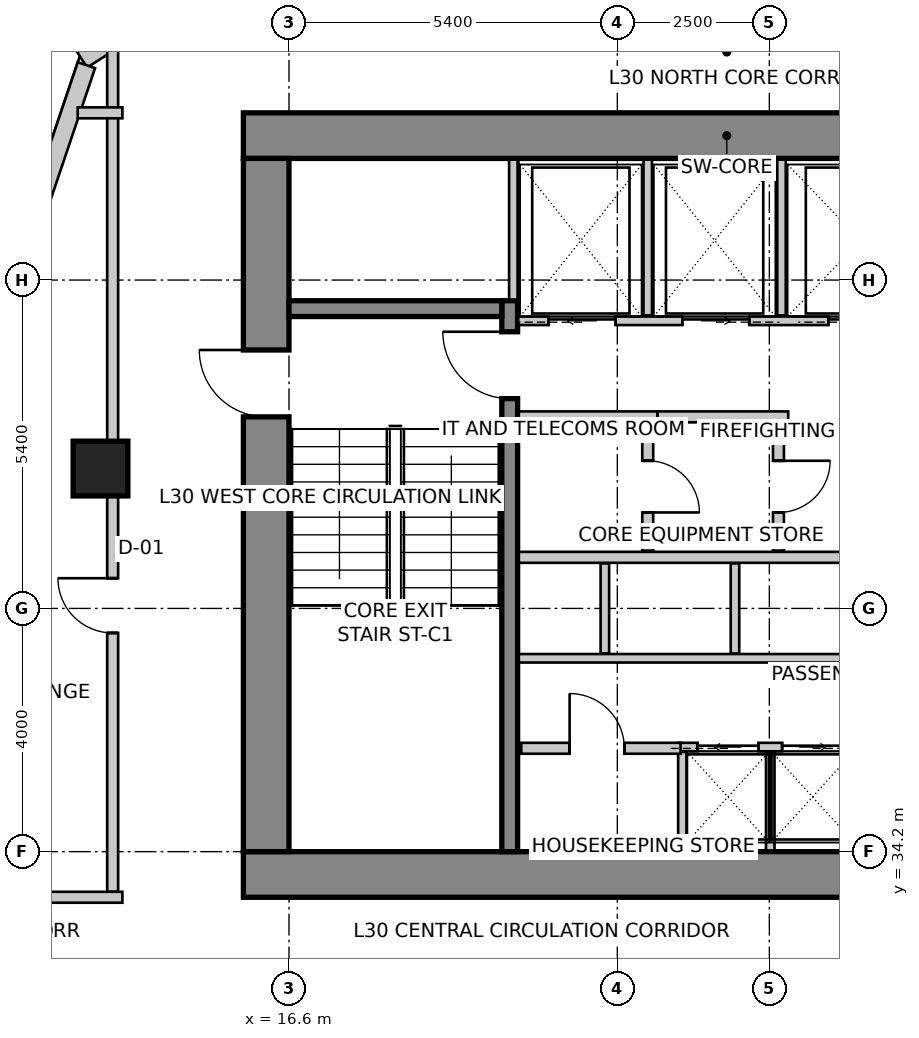
"""IFC4 building model, lengths in metres.
Left out: names, types, materials, properties, quantities, classifications, styles, units other than length and angle.
Written with IfcOpenShell. Run it as: python <this file> out.ifc"""

import sys

from ifc_helpers import new_model, si_unit, direction, frame, frame_2d, origin, origin_2d, place, context, subcontext, project, spatial, rectangle, extrude, source, transform, mapped, element, fill, save


model = new_model("IFC4")
c1 = context("Model", 3, precision=1e-05, world=origin(), true_north=direction((0.0, 1.0)))
c2 = subcontext(c1, "Body", "Model", "MODEL_VIEW")
j1 = project(units=[si_unit("LENGTHUNIT", "METRE"), si_unit("PLANEANGLEUNIT", "RADIAN")], contexts=[c1])
p1 = place(None, origin())
s1 = spatial("IfcSite", under=j1, at=p1, CompositionType="ELEMENT")
p2 = place(p1, origin())
s2 = spatial("IfcBuilding", under=s1, at=p2, CompositionType="ELEMENT")
p3 = place(p2, frame((0.0, 0.0, 125.0)))
s3 = spatial("IfcBuildingStorey", under=s2, at=p3, CompositionType="ELEMENT", Elevation=125.0)
p4 = place(p3, frame((15.85, 45.975, 0.0), z_axis=(0.0, 0.0, 1.0), x_axis=(1.0, 0.0, 0.0)))
e1 = element("IfcWall", 1, at=p4, inside=s3, PredefinedType="SHEAR", context=c2, shape_type="SweptSolid", body=[
    extrude(rectangle(XDim=15.9, YDim=0.75, at=frame_2d((7.95, 0.0))), origin(), (0.0, 0.0, 1.0), 3.6),
])
p5 = place(p3, frame((15.85, 33.825, 0.0), z_axis=(0.0, 0.0, 1.0), x_axis=(1.0, 0.0, 0.0)))
e2 = element("IfcWall", 2, at=p5, inside=s3, PredefinedType="SHEAR", context=c2, shape_type="SweptSolid", body=[
    extrude(rectangle(XDim=15.9, YDim=0.75, at=frame_2d((7.95, 0.0))), origin(), (0.0, 0.0, 1.0), 3.6),
])
m1 = source(origin(), c2, "Body", "SweptSolid", [
    extrude(rectangle(XDim=1.3, YDim=2.15, at=frame_2d((0.65, 1.075))), frame((0.0, 0.385, 0.0), z_axis=(0.0, -1.0, 0.0), x_axis=(1.0, 0.0, 0.0)), (0.0, 0.0, 1.0), 0.77),
])
p6 = place(p5, frame((10.08, 0.0, 0.0)))
e3 = element("IfcOpeningElement", 3, at=p6, cuts=e2, PredefinedType="OPENING", context=c2, shape_type="MappedRepresentation", body=[
    mapped(m1, transform((0.0, 0.0, 0.0), scale=1.0)),
])
p7 = place(p3, frame((16.225, 34.2, 0.0), z_axis=(0.0, 0.0, 1.0), x_axis=(0.0, 1.0, 0.0)))
e4 = element("IfcWall", 4, at=p7, inside=s3, PredefinedType="SHEAR", context=c2, shape_type="SweptSolid", body=[
    extrude(rectangle(XDim=11.4, YDim=0.75, at=frame_2d((5.7, 0.0))), origin(), (0.0, 0.0, 1.0), 3.6),
])
m2 = source(origin(), c2, "Body", "SweptSolid", [
    extrude(rectangle(XDim=1.1, YDim=2.15, at=frame_2d((0.55, 1.075))), frame((0.0, 0.385, 0.0), z_axis=(0.0, -1.0, 0.0), x_axis=(1.0, 0.0, 0.0)), (0.0, 0.0, 1.0), 0.77),
])
p8 = place(p7, frame((7.15, 0.0, 0.0)))
e5 = element("IfcOpeningElement", 5, at=p8, cuts=e4, PredefinedType="OPENING", context=c2, shape_type="MappedRepresentation", body=[
    mapped(m2, transform((0.0, 0.0, 0.0), scale=1.0)),
])
p9 = place(p3, frame((20.23, 34.2, 0.0), z_axis=(0.0, 0.0, 1.0), x_axis=(0.0, 1.0, 0.0)))
e6 = element("IfcWall", 6, at=p9, inside=s3, PredefinedType="SHEAR", context=c2, shape_type="SweptSolid", body=[
    extrude(rectangle(XDim=9.06, YDim=0.26, at=frame_2d((4.53, 0.0))), origin(), (0.0, 0.0, 1.0), 3.6),
])
m3 = source(origin(), c2, "Body", "SweptSolid", [
    extrude(rectangle(XDim=1.1, YDim=2.15, at=frame_2d((0.55, 1.075))), frame((0.0, 0.14, 0.0), z_axis=(0.0, -1.0, 0.0), x_axis=(1.0, 0.0, 0.0)), (0.0, 0.0, 1.0), 0.28),
])
p10 = place(p9, frame((7.45, 0.0, 0.0)))
e7 = element("IfcOpeningElement", 7, at=p10, cuts=e6, PredefinedType="OPENING", context=c2, shape_type="MappedRepresentation", body=[
    mapped(m3, transform((0.0, 0.0, 0.0), scale=1.0)),
])
p11 = place(p3, frame((16.6, 43.13, 0.0), z_axis=(0.0, 0.0, 1.0), x_axis=(1.0, 0.0, 0.0)))
e8 = element("IfcWall", 8, at=p11, inside=s3, PredefinedType="SHEAR", context=c2, shape_type="SweptSolid", body=[
    extrude(rectangle(XDim=3.5, YDim=0.26, at=frame_2d((1.75, 0.0))), origin(), (0.0, 0.0, 1.0), 3.6),
])
m4 = source(origin(), c2, "Body", "SweptSolid", [
    extrude(rectangle(XDim=0.9, YDim=0.9, at=origin_2d()), origin(), (0.0, 0.0, 1.0), 3.6),
])
p12 = place(p3, frame((13.5, 40.5, 0.0), z_axis=(0.0, 0.0, 1.0), x_axis=(1.0, 0.0, 0.0)))
e9 = element("IfcColumn", 9, at=p12, inside=s3, PredefinedType="COLUMN", context=c2, shape_type="MappedRepresentation", body=[
    mapped(m4, transform((0.0, 0.0, 0.0), scale=1.0)),
])
p13 = place(p3, frame((53.561, 47.48, 0.0), z_axis=(0.0, 0.0, 1.0), x_axis=(-0.985845173895, 0.167658262868, 0.0)))
e10 = element("IfcWall", 10, at=p13, inside=s3, PredefinedType="SOLIDWALL", context=c2, shape_type="SweptSolid", body=[
    extrude(rectangle(XDim=32.132, YDim=0.3, at=frame_2d((16.066, 0.0))), origin(), (0.0, 0.0, 1.0), 3.35),
])
m5 = source(origin(), c2, "Body", "SweptSolid", [
    extrude(rectangle(XDim=2.4, YDim=2.2, at=frame_2d((1.2, 1.1))), frame((0.0, 0.16, 0.0), z_axis=(0.0, -1.0, 0.0), x_axis=(1.0, 0.0, 0.0)), (0.0, 0.0, 1.0), 0.32),
])
p14 = place(p13, frame((0.882, 0.0, 0.85)))
e11 = element("IfcOpeningElement", 11, at=p14, cuts=e10, PredefinedType="OPENING", context=c2, shape_type="MappedRepresentation", body=[
    mapped(m5, transform((0.0, 0.0, 0.0), scale=1.0)),
])
p15 = place(p13, frame((6.686, 0.0, 0.85)))
e12 = element("IfcOpeningElement", 12, at=p15, cuts=e10, PredefinedType="OPENING", context=c2, shape_type="MappedRepresentation", body=[
    mapped(m5, transform((0.0, 0.0, 0.0), scale=1.0)),
])
p16 = place(p13, frame((13.449, 0.0, 0.85)))
e13 = element("IfcOpeningElement", 13, at=p16, cuts=e10, PredefinedType="OPENING", context=c2, shape_type="MappedRepresentation", body=[
    mapped(m5, transform((0.0, 0.0, 0.0), scale=1.0)),
])
m6 = source(origin(), c2, "Body", "SweptSolid", [
    extrude(rectangle(XDim=1.8, YDim=2.1, at=frame_2d((0.9, 1.05))), frame((0.0, 0.16, 0.0), z_axis=(0.0, -1.0, 0.0), x_axis=(1.0, 0.0, 0.0)), (0.0, 0.0, 1.0), 0.32),
])
p17 = place(p13, frame((17.889, 0.0, 0.85)))
e14 = element("IfcOpeningElement", 14, at=p17, cuts=e10, PredefinedType="OPENING", context=c2, shape_type="MappedRepresentation", body=[
    mapped(m6, transform((0.0, 0.0, 0.0), scale=1.0)),
])
p18 = place(p13, frame((20.309, 0.0, 0.85)))
e15 = element("IfcOpeningElement", 15, at=p18, cuts=e10, PredefinedType="OPENING", context=c2, shape_type="MappedRepresentation", body=[
    mapped(m5, transform((0.0, 0.0, 0.0), scale=1.0)),
])
p19 = place(p13, frame((25.4, 0.0, 0.85)))
e16 = element("IfcOpeningElement", 16, at=p19, cuts=e10, PredefinedType="OPENING", context=c2, shape_type="MappedRepresentation", body=[
    mapped(m5, transform((0.0, 0.0, 0.0), scale=1.0)),
])
m7 = source(origin(), c2, "Body", "SweptSolid", [
    extrude(rectangle(XDim=1.2, YDim=1.6, at=frame_2d((0.6, 0.8))), frame((0.0, 0.16, 0.0), z_axis=(0.0, -1.0, 0.0), x_axis=(1.0, 0.0, 0.0)), (0.0, 0.0, 1.0), 0.32),
])
p20 = place(p13, frame((30.5, 0.0, 0.85)))
e17 = element("IfcOpeningElement", 17, at=p20, cuts=e10, PredefinedType="OPENING", context=c2, shape_type="MappedRepresentation", body=[
    mapped(m7, transform((0.0, 0.0, 0.0), scale=1.0)),
])
p21 = place(p3, frame((21.875, 52.742, 0.0), z_axis=(0.0, 0.0, 1.0), x_axis=(-0.843662465249, -0.536873956092, 0.0)))
e18 = element("IfcWall", 18, at=p21, inside=s3, PredefinedType="SOLIDWALL", context=c2, shape_type="SweptSolid", body=[
    extrude(rectangle(XDim=10.284, YDim=0.3, at=frame_2d((5.142, 0.0))), origin(), (0.0, 0.0, 1.0), 3.35),
])
m8 = source(origin(), c2, "Body", "SweptSolid", [
    extrude(rectangle(XDim=2.1, YDim=2.0, at=frame_2d((1.05, 1.0))), frame((0.0, 0.16, 0.0), z_axis=(0.0, -1.0, 0.0), x_axis=(1.0, 0.0, 0.0)), (0.0, 0.0, 1.0), 0.32),
])
p22 = place(p21, frame((2.806, 0.0, 0.85)))
e19 = element("IfcOpeningElement", 19, at=p22, cuts=e18, PredefinedType="OPENING", context=c2, shape_type="MappedRepresentation", body=[
    mapped(m8, transform((0.0, 0.0, 0.0), scale=1.0)),
])
p23 = place(p21, frame((8.087, 0.0, 0.85)))
e20 = element("IfcOpeningElement", 20, at=p23, cuts=e18, PredefinedType="OPENING", context=c2, shape_type="MappedRepresentation", body=[
    mapped(m7, transform((0.0, 0.0, 0.0), scale=1.0)),
])
p24 = place(p3, frame((13.269, 47.134, 0.0), z_axis=(0.0, 0.0, 1.0), x_axis=(-0.319929596295, -0.947441319246, 0.0)))
e21 = element("IfcWall", 21, at=p24, inside=s3, PredefinedType="SOLIDWALL", context=c2, shape_type="SweptSolid", body=[
    extrude(rectangle(XDim=16.134, YDim=0.3, at=frame_2d((8.067, 0.0))), origin(), (0.0, 0.0, 1.0), 3.35),
])
p25 = place(p24, frame((2.276, 0.0, 0.85)))
e22 = element("IfcOpeningElement", 22, at=p25, cuts=e21, PredefinedType="OPENING", context=c2, shape_type="MappedRepresentation", body=[
    mapped(m5, transform((0.0, 0.0, 0.0), scale=1.0)),
])
p26 = place(p24, frame((7.361, 0.0, 0.85)))
e23 = element("IfcOpeningElement", 23, at=p26, cuts=e21, PredefinedType="OPENING", context=c2, shape_type="MappedRepresentation", body=[
    mapped(m8, transform((0.0, 0.0, 0.0), scale=1.0)),
])
p27 = place(p24, frame((12.147, 0.0, 0.85)))
e24 = element("IfcOpeningElement", 24, at=p27, cuts=e21, PredefinedType="OPENING", context=c2, shape_type="MappedRepresentation", body=[
    mapped(m5, transform((0.0, 0.0, 0.0), scale=1.0)),
])
p28 = place(p3, frame((20.37, 42.93, 0.0), z_axis=(0.0, 0.0, 1.0), x_axis=(1.0, 0.0, 0.0)))
e25 = element("IfcWall", 25, at=p28, inside=s3, PredefinedType="SOLIDWALL", context=c2, shape_type="SweptSolid", body=[
    extrude(rectangle(XDim=6.86, YDim=0.14, at=frame_2d((3.43, 0.0))), origin(), (0.0, 0.0, 1.0), 3.35),
])
m9 = source(origin(), c2, "Body", "SweptSolid", [
    extrude(rectangle(XDim=1.1, YDim=2.15, at=frame_2d((0.55, 1.075))), frame((0.0, 0.08, 0.0), z_axis=(0.0, -1.0, 0.0), x_axis=(1.0, 0.0, 0.0)), (0.0, 0.0, 1.0), 0.16),
])
p29 = place(p28, frame((0.5, 0.0, 0.0)))
e26 = element("IfcOpeningElement", 26, at=p29, cuts=e25, PredefinedType="OPENING", context=c2, shape_type="MappedRepresentation", body=[
    mapped(m9, transform((0.0, 0.0, 0.0), scale=1.0)),
])
p30 = place(p28, frame((2.7, 0.0, 0.0)))
e27 = element("IfcOpeningElement", 27, at=p30, cuts=e25, PredefinedType="OPENING", context=c2, shape_type="MappedRepresentation", body=[
    mapped(m9, transform((0.0, 0.0, 0.0), scale=1.0)),
])
p31 = place(p28, frame((5.1, 0.0, 0.0)))
e28 = element("IfcOpeningElement", 28, at=p31, cuts=e25, PredefinedType="OPENING", context=c2, shape_type="MappedRepresentation", body=[
    mapped(m9, transform((0.0, 0.0, 0.0), scale=1.0)),
])
p32 = place(p3, frame((20.29, 43.28, 0.0), z_axis=(0.0, 0.0, 1.0), x_axis=(0.0, 1.0, 0.0)))
e29 = element("IfcWall", 29, at=p32, inside=s3, PredefinedType="SOLIDWALL", context=c2, shape_type="SweptSolid", body=[
    extrude(rectangle(XDim=2.3, YDim=0.14, at=frame_2d((1.15, 0.0))), origin(), (0.0, 0.0, 1.0), 3.35),
])
for number, where, z_axis, x_axis in (
    (30, (22.5, 43.02, 0.0), (0.0, 0.0, 1.0), (0.0, 1.0, 0.0)),
    (31, (24.7, 43.02, 0.0), (0.0, 0.0, 1.0), (0.0, 1.0, 0.0)),
):
    element("IfcWall", number, at=place(p3, frame(where, z_axis=z_axis, x_axis=x_axis)), inside=s3, PredefinedType="SOLIDWALL", context=c2, shape_type="SweptSolid", body=[
        extrude(rectangle(XDim=2.56, YDim=0.14, at=frame_2d((1.28, 0.0))), origin(), (0.0, 0.0, 1.0), 3.35),
    ])
p33 = place(p3, frame((23.0, 35.92, 0.0), z_axis=(0.0, 0.0, 1.0), x_axis=(1.0, 0.0, 0.0)))
e32 = element("IfcWall", 32, at=p33, inside=s3, PredefinedType="SOLIDWALL", context=c2, shape_type="SweptSolid", body=[
    extrude(rectangle(XDim=3.03, YDim=0.14, at=frame_2d((1.515, 0.0))), origin(), (0.0, 0.0, 1.0), 3.35),
])
m10 = source(origin(), c2, "Body", "SweptSolid", [
    extrude(rectangle(XDim=1.0, YDim=2.15, at=frame_2d((0.5, 1.075))), frame((0.0, 0.08, 0.0), z_axis=(0.0, -1.0, 0.0), x_axis=(1.0, 0.0, 0.0)), (0.0, 0.0, 1.0), 0.16),
])
p34 = place(p33, frame((0.32, 0.0, 0.0)))
e33 = element("IfcOpeningElement", 33, at=p34, cuts=e32, PredefinedType="OPENING", context=c2, shape_type="MappedRepresentation", body=[
    mapped(m10, transform((0.0, 0.0, 0.0), scale=1.0)),
])
p35 = place(p33, frame((1.71, 0.0, 0.0)))
e34 = element("IfcOpeningElement", 34, at=p35, cuts=e32, PredefinedType="OPENING", context=c2, shape_type="MappedRepresentation", body=[
    mapped(m10, transform((0.0, 0.0, 0.0), scale=1.0)),
])
for number, where, z_axis, x_axis in (
    (35, (23.07, 34.22, 0.0), (0.0, 0.0, 1.0), (0.0, 1.0, 0.0)),
    (36, (24.515, 34.22, 0.0), (0.0, 0.0, 1.0), (0.0, 1.0, 0.0)),
):
    element("IfcWall", number, at=place(p3, frame(where, z_axis=z_axis, x_axis=x_axis)), inside=s3, PredefinedType="SOLIDWALL", context=c2, shape_type="SweptSolid", body=[
        extrude(rectangle(XDim=1.62, YDim=0.14, at=frame_2d((0.81, 0.0))), origin(), (0.0, 0.0, 1.0), 2.642),
    ])
p36 = place(p3, frame((20.38, 37.38, 0.0), z_axis=(0.0, 0.0, 1.0), x_axis=(1.0, 0.0, 0.0)))
e37 = element("IfcWall", 37, at=p36, inside=s3, PredefinedType="SOLIDWALL", context=c2, shape_type="SweptSolid", body=[
    extrude(rectangle(XDim=5.75, YDim=0.14, at=frame_2d((2.875, 0.0))), origin(), (0.0, 0.0, 1.0), 3.35),
])
p37 = place(p3, frame((20.38, 39.04, 0.0), z_axis=(0.0, 0.0, 1.0), x_axis=(1.0, 0.0, 0.0)))
e38 = element("IfcWall", 38, at=p37, inside=s3, PredefinedType="SOLIDWALL", context=c2, shape_type="SweptSolid", body=[
    extrude(rectangle(XDim=5.75, YDim=0.18, at=frame_2d((2.875, 0.0))), origin(), (0.0, 0.0, 1.0), 3.35),
])
for number, where, z_axis, x_axis in (
    (39, (21.795, 37.46, 0.0), (0.0, 0.0, 1.0), (0.0, 1.0, 0.0)),
    (40, (23.935, 37.46, 0.0), (0.0, 0.0, 1.0), (0.0, 1.0, 0.0)),
):
    element("IfcWall", number, at=place(p3, frame(where, z_axis=z_axis, x_axis=x_axis)), inside=s3, PredefinedType="SOLIDWALL", context=c2, shape_type="SweptSolid", body=[
        extrude(rectangle(XDim=1.48, YDim=0.14, at=frame_2d((0.74, 0.0))), origin(), (0.0, 0.0, 1.0), 3.35),
    ])
p38 = place(p3, frame((22.66, 41.35, 0.0), z_axis=(0.0, 0.0, 1.0), x_axis=(-1.0, 0.0, 0.0)))
e41 = element("IfcWall", 41, at=p38, inside=s3, PredefinedType="PARTITIONING", context=c2, shape_type="SweptSolid", body=[
    extrude(rectangle(XDim=2.28, YDim=0.18, at=frame_2d((1.14, 0.0))), origin(), (0.0, 0.0, 1.0), 3.35),
])
p39 = place(p3, frame((24.81, 41.35, 0.0), z_axis=(0.0, 0.0, 1.0), x_axis=(-1.0, 0.0, 0.0)))
e42 = element("IfcWall", 42, at=p39, inside=s3, PredefinedType="PARTITIONING", context=c2, shape_type="SweptSolid", body=[
    extrude(rectangle(XDim=2.148, YDim=0.18, at=frame_2d((1.074, 0.0))), origin(), (0.0, 0.0, 1.0), 3.35),
])
p40 = place(p3, frame((22.5, 41.256, 0.0), z_axis=(0.0, 0.0, 1.0), x_axis=(0.0, -1.0, 0.0)))
e43 = element("IfcWall", 43, at=p40, inside=s3, PredefinedType="PARTITIONING", context=c2, shape_type="SweptSolid", body=[
    extrude(rectangle(XDim=2.106, YDim=0.18, at=frame_2d((1.053, 0.0))), origin(), (0.0, 0.0, 1.0), 3.35),
])
m11 = source(origin(), c2, "Body", "SweptSolid", [
    extrude(rectangle(XDim=0.85, YDim=2.15, at=frame_2d((0.425, 1.075))), frame((0.0, 0.1, 0.0), z_axis=(0.0, -1.0, 0.0), x_axis=(1.0, 0.0, 0.0)), (0.0, 0.0, 1.0), 0.2),
])
p41 = place(p40, frame((0.628, 0.0, 0.0)))
e44 = element("IfcOpeningElement", 44, at=p41, cuts=e43, PredefinedType="OPENING", context=c2, shape_type="MappedRepresentation", body=[
    mapped(m11, transform((0.0, 0.0, 0.0), scale=1.0)),
])
p42 = place(p3, frame((24.65, 41.256, 0.0), z_axis=(0.0, 0.0, 1.0), x_axis=(0.0, -1.0, 0.0)))
e45 = element("IfcWall", 45, at=p42, inside=s3, PredefinedType="PARTITIONING", context=c2, shape_type="SweptSolid", body=[
    extrude(rectangle(XDim=2.106, YDim=0.18, at=frame_2d((1.053, 0.0))), origin(), (0.0, 0.0, 1.0), 3.35),
])
p43 = place(p42, frame((0.628, 0.0, 0.0)))
e46 = element("IfcOpeningElement", 46, at=p43, cuts=e45, PredefinedType="OPENING", context=c2, shape_type="MappedRepresentation", body=[
    mapped(m11, transform((0.0, 0.0, 0.0), scale=1.0)),
])
p44 = place(p3, frame((20.42, 35.9, 0.0), z_axis=(0.0, 0.0, 1.0), x_axis=(1.0, 0.0, 0.0)))
e47 = element("IfcWall", 47, at=p44, inside=s3, PredefinedType="PARTITIONING", context=c2, shape_type="SweptSolid", body=[
    extrude(rectangle(XDim=2.62, YDim=0.18, at=frame_2d((1.31, 0.0))), origin(), (0.0, 0.0, 1.0), 3.35),
])
m12 = source(origin(), c2, "Body", "SweptSolid", [
    extrude(rectangle(XDim=0.9, YDim=2.15, at=frame_2d((0.45, 1.075))), frame((0.0, 0.1, 0.0), z_axis=(0.0, -1.0, 0.0), x_axis=(1.0, 0.0, 0.0)), (0.0, 0.0, 1.0), 0.2),
])
p45 = place(p44, frame((0.796, 0.0, 0.0)))
e48 = element("IfcOpeningElement", 48, at=p45, cuts=e47, PredefinedType="OPENING", context=c2, shape_type="MappedRepresentation", body=[
    mapped(m12, transform((0.0, 0.0, 0.0), scale=1.0)),
])
p46 = place(p3, frame((12.594, 33.45, 0.0), z_axis=(0.0, 0.0, 1.0), x_axis=(1.0, 0.0, 0.0)))
e49 = element("IfcWall", 49, at=p46, inside=s3, PredefinedType="PARTITIONING", context=c2, shape_type="SweptSolid", body=[
    extrude(rectangle(XDim=1.266, YDim=0.18, at=frame_2d((0.633, 0.0))), origin(), (0.0, 0.0, 1.0), 3.35),
])
p47 = place(p3, frame((13.7, 33.544, 0.0), z_axis=(0.0, 0.0, 1.0), x_axis=(0.0, 1.0, 0.0)))
e50 = element("IfcWall", 50, at=p47, inside=s3, PredefinedType="PARTITIONING", context=c2, shape_type="SweptSolid", body=[
    extrude(rectangle(XDim=13.86, YDim=0.18, at=frame_2d((6.93, 0.0))), origin(), (0.0, 0.0, 1.0), 2.492),
])
p48 = place(p47, frame((4.253, 0.0, 0.0)))
e51 = element("IfcOpeningElement", 51, at=p48, cuts=e50, PredefinedType="OPENING", context=c2, shape_type="MappedRepresentation", body=[
    mapped(m12, transform((0.0, 0.0, 0.0), scale=1.0)),
])
p49 = place(p3, frame((13.86, 46.35, 0.0), z_axis=(0.0, 0.0, 1.0), x_axis=(-1.0, 0.0, 0.0)))
e52 = element("IfcWall", 52, at=p49, inside=s3, PredefinedType="PARTITIONING", context=c2, shape_type="SweptSolid", body=[
    extrude(rectangle(XDim=0.735, YDim=0.18, at=frame_2d((0.367, 0.0))), origin(), (0.0, 0.0, 1.0), 3.35),
])
m13 = source(origin(), c2, "Body", "SweptSolid", [
    extrude(rectangle(XDim=1.1, YDim=2.15, at=frame_2d((0.55, 1.075))), frame((0.0, 0.025, 0.0), z_axis=(0.0, -1.0, 0.0), x_axis=(1.0, 0.0, 0.0)), (0.0, 0.0, 1.0), 0.05),
])
p50 = place(p29, origin())
e53 = element("IfcDoor", 53, at=p50, inside=s3, OperationType="SLIDING_TO_LEFT", PredefinedType="DOOR", context=c2, shape_type="MappedRepresentation", body=[
    mapped(m13, transform((0.0, 0.0, 0.0), scale=1.0)),
])
fill(e26, e53)
p51 = place(p30, origin())
e54 = element("IfcDoor", 54, at=p51, inside=s3, OperationType="SLIDING_TO_RIGHT", PredefinedType="DOOR", context=c2, shape_type="MappedRepresentation", body=[
    mapped(m13, transform((0.0, 0.0, 0.0), scale=1.0)),
])
fill(e27, e54)
m14 = source(origin(), c2, "Body", "SweptSolid", [
    extrude(rectangle(XDim=1.1, YDim=2.15, at=frame_2d((0.55, 1.075))), frame((0.0, 0.025, 0.0), z_axis=(0.0, -1.0, 0.0), x_axis=(1.0, 0.0, 0.0)), (0.0, 0.0, 1.0), 0.05),
])
p52 = place(p31, origin())
e55 = element("IfcDoor", 55, at=p52, inside=s3, OperationType="SLIDING_TO_LEFT", PredefinedType="DOOR", context=c2, shape_type="MappedRepresentation", body=[
    mapped(m14, transform((0.0, 0.0, 0.0), scale=1.0)),
])
fill(e28, e55)
m15 = source(origin(), c2, "Body", "SweptSolid", [
    extrude(rectangle(XDim=1.0, YDim=2.15, at=frame_2d((0.5, 1.075))), frame((0.0, 0.025, 0.0), z_axis=(0.0, -1.0, 0.0), x_axis=(1.0, 0.0, 0.0)), (0.0, 0.0, 1.0), 0.05),
])
p53 = place(p34, origin())
e56 = element("IfcDoor", 56, at=p53, inside=s3, OperationType="SLIDING_TO_LEFT", PredefinedType="DOOR", context=c2, shape_type="MappedRepresentation", body=[
    mapped(m15, transform((0.0, 0.0, 0.0), scale=1.0)),
])
fill(e33, e56)
p54 = place(p35, origin())
e57 = element("IfcDoor", 57, at=p54, inside=s3, OperationType="SLIDING_TO_RIGHT", PredefinedType="DOOR", context=c2, shape_type="MappedRepresentation", body=[
    mapped(m15, transform((0.0, 0.0, 0.0), scale=1.0)),
])
fill(e34, e57)
m16 = source(origin(), c2, "Body", "SweptSolid", [
    extrude(rectangle(XDim=1.1, YDim=2.15, at=frame_2d((0.55, 1.075))), frame((0.0, 0.025, 0.0), z_axis=(0.0, -1.0, 0.0), x_axis=(1.0, 0.0, 0.0)), (0.0, 0.0, 1.0), 0.05),
])
p55 = place(p10, origin())
e58 = element("IfcDoor", 58, at=p55, inside=s3, OperationType="SINGLE_SWING_RIGHT", PredefinedType="DOOR", context=c2, shape_type="MappedRepresentation", body=[
    mapped(m16, transform((0.0, 0.0, 0.0), scale=1.0)),
])
fill(e7, e58)
p56 = place(p8, origin())
e59 = element("IfcDoor", 59, at=p56, inside=s3, OperationType="SINGLE_SWING_RIGHT", PredefinedType="DOOR", context=c2, shape_type="MappedRepresentation", body=[
    mapped(m16, transform((0.0, 0.0, 0.0), scale=1.0)),
])
fill(e5, e59)
m17 = source(origin(), c2, "Body", "SweptSolid", [
    extrude(rectangle(XDim=0.85, YDim=2.15, at=frame_2d((0.425, 1.075))), frame((0.0, 0.025, 0.0), z_axis=(0.0, -1.0, 0.0), x_axis=(1.0, 0.0, 0.0)), (0.0, 0.0, 1.0), 0.05),
])
p57 = place(p41, origin())
e60 = element("IfcDoor", 60, at=p57, inside=s3, OperationType="SINGLE_SWING_RIGHT", PredefinedType="DOOR", context=c2, shape_type="MappedRepresentation", body=[
    mapped(m17, transform((0.0, 0.0, 0.0), scale=1.0)),
])
fill(e44, e60)
p58 = place(p43, origin())
e61 = element("IfcDoor", 61, at=p58, inside=s3, OperationType="SINGLE_SWING_LEFT", PredefinedType="DOOR", context=c2, shape_type="MappedRepresentation", body=[
    mapped(m17, transform((0.0, 0.0, 0.0), scale=1.0)),
])
fill(e46, e61)
m18 = source(origin(), c2, "Body", "SweptSolid", [
    extrude(rectangle(XDim=0.9, YDim=2.15, at=frame_2d((0.45, 1.075))), frame((0.0, 0.025, 0.0), z_axis=(0.0, -1.0, 0.0), x_axis=(1.0, 0.0, 0.0)), (0.0, 0.0, 1.0), 0.05),
])
p59 = place(p45, origin())
e62 = element("IfcDoor", 62, at=p59, inside=s3, OperationType="SINGLE_SWING_LEFT", PredefinedType="DOOR", context=c2, shape_type="MappedRepresentation", body=[
    mapped(m18, transform((0.0, 0.0, 0.0), scale=1.0)),
])
fill(e48, e62)
m19 = source(origin(), c2, "Body", "SweptSolid", [
    extrude(rectangle(XDim=0.9, YDim=2.15, at=frame_2d((0.45, 1.075))), frame((0.0, 0.025, 0.0), z_axis=(0.0, -1.0, 0.0), x_axis=(1.0, 0.0, 0.0)), (0.0, 0.0, 1.0), 0.05),
])
p60 = place(p48, origin())
e63 = element("IfcDoor", 63, at=p60, inside=s3, OperationType="SINGLE_SWING_RIGHT", PredefinedType="DOOR", context=c2, shape_type="MappedRepresentation", body=[
    mapped(m19, transform((0.0, 0.0, 0.0), scale=1.0)),
])
fill(e51, e63)
save(model, sys.argv[1])
